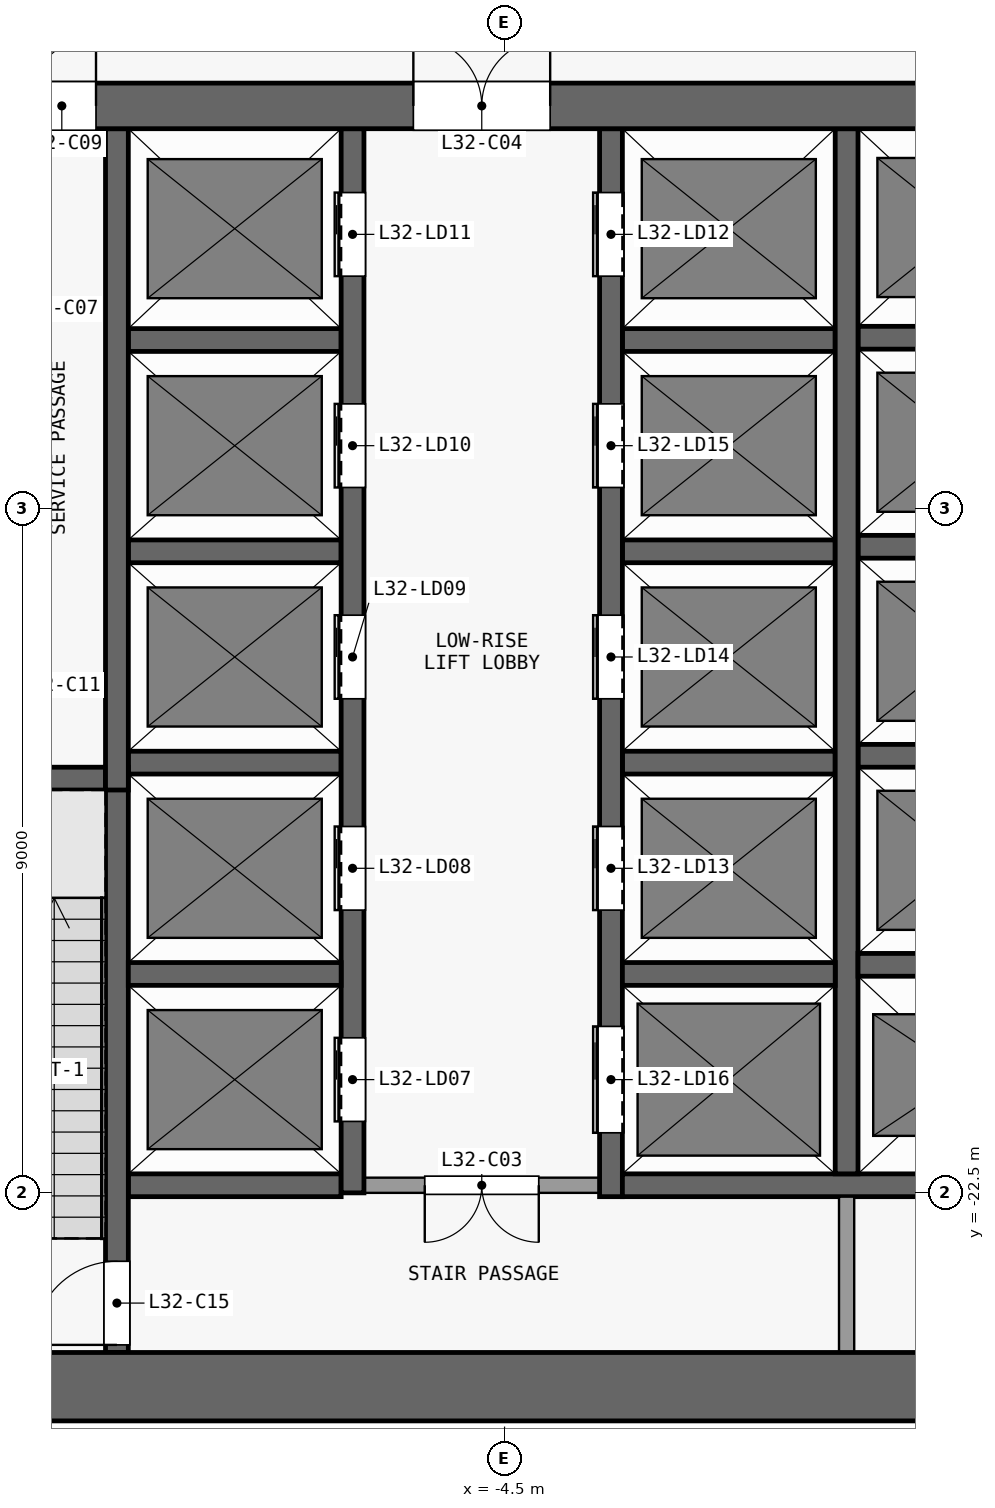
"""IFC4 building model, lengths in metres.
Left out: names, types, materials, properties, quantities, classifications, styles, units other than length and angle.
Written with IfcOpenShell. Run it as: python <this file> out.ifc"""

import sys

from ifc_helpers import new_model, si_unit, direction, frame, frame_2d, origin, place, context, subcontext, project, spatial, rectangle, extrude, element, fill, save


model = new_model("IFC4")
c1 = context("Model", 3, precision=1e-05, world=origin(), true_north=direction((0.0, 1.0)))
c2 = subcontext(c1, "Body", "Model", "MODEL_VIEW")
j1 = project(units=[si_unit("LENGTHUNIT", "METRE"), si_unit("PLANEANGLEUNIT", "RADIAN")], contexts=[c1])
p1 = place(None, origin())
s1 = spatial("IfcSite", under=j1, at=p1, CompositionType="ELEMENT")
p2 = place(p1, origin())
s2 = spatial("IfcBuilding", under=s1, at=p2, CompositionType="ELEMENT")
p3 = place(p2, frame((0.0, 0.0, 127.9)))
s3 = spatial("IfcBuildingStorey", under=s2, at=p3, CompositionType="ELEMENT", Elevation=127.9)
p4 = place(p3, frame((-13.4, -25.05, 0.0), z_axis=(0.0, 0.0, 1.0), x_axis=(1.0, 0.0, 0.0)))
e1 = element("IfcWall", 1, at=p4, inside=s3, PredefinedType="SHEAR", context=c2, shape_type="SweptSolid", body=[
    extrude(rectangle(XDim=26.8, YDim=0.9, at=frame_2d((13.4, 0.0))), origin(), (0.0, 0.0, 1.0), 5.7),
])
p5 = place(p3, frame((-13.4, -8.2, 0.0), z_axis=(0.0, 0.0, 1.0), x_axis=(1.0, 0.0, 0.0)))
e2 = element("IfcWall", 2, at=p5, inside=s3, PredefinedType="SHEAR", context=c2, shape_type="SweptSolid", body=[
    extrude(rectangle(XDim=26.8, YDim=0.6, at=frame_2d((13.4, 0.0))), origin(), (0.0, 0.0, 1.0), 5.7),
])
p6 = place(p5, frame((7.7, 0.0, 0.0)))
e3 = element("IfcOpeningElement", 3, at=p6, cuts=e2, PredefinedType="OPENING", context=c2, shape_type="SweptSolid", body=[
    extrude(rectangle(XDim=1.8, YDim=2.1, at=frame_2d((0.9, 1.05))), frame((0.0, 0.31, 0.0), z_axis=(0.0, -1.0, 0.0), x_axis=(1.0, 0.0, 0.0)), (0.0, 0.0, 1.0), 0.62),
])
p7 = place(p5, frame((17.3, 0.0, 0.0)))
e4 = element("IfcOpeningElement", 4, at=p7, cuts=e2, PredefinedType="OPENING", context=c2, shape_type="SweptSolid", body=[
    extrude(rectangle(XDim=1.8, YDim=2.1, at=frame_2d((0.9, 1.05))), frame((0.0, 0.31, 0.0), z_axis=(0.0, -1.0, 0.0), x_axis=(1.0, 0.0, 0.0)), (0.0, 0.0, 1.0), 0.62),
])
p8 = place(p5, frame((2.625, 0.0, 0.0)))
e5 = element("IfcOpeningElement", 5, at=p8, cuts=e2, PredefinedType="OPENING", context=c2, shape_type="SweptSolid", body=[
    extrude(rectangle(XDim=0.9, YDim=2.1, at=frame_2d((0.45, 1.05))), frame((0.0, 0.31, 0.0), z_axis=(0.0, -1.0, 0.0), x_axis=(1.0, 0.0, 0.0)), (0.0, 0.0, 1.0), 0.62),
])
p9 = place(p5, frame((23.275, 0.0, 0.0)))
e6 = element("IfcOpeningElement", 6, at=p9, cuts=e2, PredefinedType="OPENING", context=c2, shape_type="SweptSolid", body=[
    extrude(rectangle(XDim=0.9, YDim=2.1, at=frame_2d((0.45, 1.05))), frame((0.0, 0.31, 0.0), z_axis=(0.0, -1.0, 0.0), x_axis=(1.0, 0.0, 0.0)), (0.0, 0.0, 1.0), 0.62),
])
p10 = place(p3, frame((-9.45, -22.4, 0.0), z_axis=(0.0, 0.0, 1.0), x_axis=(1.0, 0.0, 0.0)))
e7 = element("IfcWall", 7, at=p10, inside=s3, PredefinedType="SHEAR", context=c2, shape_type="SweptSolid", body=[
    extrude(rectangle(XDim=2.8, YDim=0.3, at=frame_2d((1.4, 0.0))), origin(), (0.0, 0.0, 1.0), 5.7),
])
p11 = place(p3, frame((-3.25, -22.4, 0.0), z_axis=(0.0, 0.0, 1.0), x_axis=(-1.0, 0.0, 0.0)))
e8 = element("IfcWall", 8, at=p11, inside=s3, PredefinedType="PARTITIONING", context=c2, shape_type="SweptSolid", body=[
    extrude(rectangle(XDim=3.1, YDim=0.2, at=frame_2d((1.55, 0.0))), origin(), (0.0, 0.0, 1.0), 5.7),
])
p12 = place(p11, frame((0.8, 0.0, 0.0)))
e9 = element("IfcOpeningElement", 9, at=p12, cuts=e8, PredefinedType="OPENING", context=c2, shape_type="SweptSolid", body=[
    extrude(rectangle(XDim=1.5, YDim=2.1, at=frame_2d((0.75, 1.05))), frame((0.0, 0.11, 0.0), z_axis=(0.0, -1.0, 0.0), x_axis=(1.0, 0.0, 0.0)), (0.0, 0.0, 1.0), 0.22),
])
p13 = place(p3, frame((-2.95, -22.4, 0.0), z_axis=(0.0, 0.0, 1.0), x_axis=(1.0, 0.0, 0.0)))
e10 = element("IfcWall", 10, at=p13, inside=s3, PredefinedType="SHEAR", context=c2, shape_type="SweptSolid", body=[
    extrude(rectangle(XDim=5.9, YDim=0.3, at=frame_2d((2.95, 0.0))), origin(), (0.0, 0.0, 1.0), 5.7),
])
for number, where, z_axis, x_axis in (
    (11, (-9.45, -19.62, 0.0), (0.0, 0.0, 1.0), (1.0, 0.0, 0.0)),
    (12, (-2.95, -19.62, 0.0), (0.0, 0.0, 1.0), (1.0, 0.0, 0.0)),
    (13, (0.15, -19.5, 0.0), (0.0, 0.0, 1.0), (1.0, 0.0, 0.0)),
):
    element("IfcWall", number, at=place(p3, frame(where, z_axis=z_axis, x_axis=x_axis)), inside=s3, PredefinedType="SHEAR", context=c2, shape_type="SweptSolid", body=[
        extrude(rectangle(XDim=2.8, YDim=0.3, at=frame_2d((1.4, 0.0))), origin(), (0.0, 0.0, 1.0), 5.7),
    ])
p14 = place(p3, frame((-12.6, -17.05, 0.0), z_axis=(0.0, 0.0, 1.0), x_axis=(1.0, 0.0, 0.0)))
e14 = element("IfcWall", 14, at=p14, inside=s3, PredefinedType="SHEAR", context=c2, shape_type="SweptSolid", body=[
    extrude(rectangle(XDim=2.85, YDim=0.3, at=frame_2d((1.425, 0.0))), origin(), (0.0, 0.0, 1.0), 5.7),
])
for number, where, z_axis, x_axis in (
    (15, (-9.45, -16.84, 0.0), (0.0, 0.0, 1.0), (1.0, 0.0, 0.0)),
    (16, (-2.95, -16.84, 0.0), (0.0, 0.0, 1.0), (1.0, 0.0, 0.0)),
    (17, (0.15, -16.75, 0.0), (0.0, 0.0, 1.0), (1.0, 0.0, 0.0)),
    (18, (-9.45, -14.06, 0.0), (0.0, 0.0, 1.0), (1.0, 0.0, 0.0)),
    (19, (-2.95, -14.06, 0.0), (0.0, 0.0, 1.0), (1.0, 0.0, 0.0)),
    (20, (0.15, -14.0, 0.0), (0.0, 0.0, 1.0), (1.0, 0.0, 0.0)),
    (21, (-9.45, -11.28, 0.0), (0.0, 0.0, 1.0), (1.0, 0.0, 0.0)),
    (22, (-2.95, -11.28, 0.0), (0.0, 0.0, 1.0), (1.0, 0.0, 0.0)),
    (23, (0.15, -11.25, 0.0), (0.0, 0.0, 1.0), (1.0, 0.0, 0.0)),
):
    element("IfcWall", number, at=place(p3, frame(where, z_axis=z_axis, x_axis=x_axis)), inside=s3, PredefinedType="SHEAR", context=c2, shape_type="SweptSolid", body=[
        extrude(rectangle(XDim=2.8, YDim=0.3, at=frame_2d((1.4, 0.0))), origin(), (0.0, 0.0, 1.0), 5.7),
    ])
p15 = place(p3, frame((-9.6, -24.6, 0.0), z_axis=(0.0, 0.0, 1.0), x_axis=(0.0, 1.0, 0.0)))
e24 = element("IfcWall", 24, at=p15, inside=s3, PredefinedType="SHEAR", context=c2, shape_type="SweptSolid", body=[
    extrude(rectangle(XDim=7.7, YDim=0.3, at=frame_2d((3.85, 0.0))), origin(), (0.0, 0.0, 1.0), 5.7),
])
p16 = place(p15, frame((0.1, 0.0, 0.0)))
e25 = element("IfcOpeningElement", 25, at=p16, cuts=e24, PredefinedType="OPENING", context=c2, shape_type="SweptSolid", body=[
    extrude(rectangle(XDim=1.1, YDim=2.1, at=frame_2d((0.55, 1.05))), frame((0.0, 0.16, 0.0), z_axis=(0.0, -1.0, 0.0), x_axis=(1.0, 0.0, 0.0)), (0.0, 0.0, 1.0), 0.32),
])
p17 = place(p3, frame((-9.6, -17.2, 0.0), z_axis=(0.0, 0.0, 1.0), x_axis=(0.0, 1.0, 0.0)))
e26 = element("IfcWall", 26, at=p17, inside=s3, PredefinedType="SHEAR", context=c2, shape_type="SweptSolid", body=[
    extrude(rectangle(XDim=8.7, YDim=0.3, at=frame_2d((4.35, 0.0))), origin(), (0.0, 0.0, 1.0), 5.7),
])
p18 = place(p3, frame((-6.5, -22.5, 0.0), z_axis=(0.0, 0.0, 1.0), x_axis=(0.0, 1.0, 0.0)))
e27 = element("IfcWall", 27, at=p18, inside=s3, PredefinedType="SHEAR", context=c2, shape_type="SweptSolid", body=[
    extrude(rectangle(XDim=14.0, YDim=0.3, at=frame_2d((7.0, 0.0))), origin(), (0.0, 0.0, 1.0), 5.7),
])
p19 = place(p18, frame((0.94, 0.0, 0.0)))
e28 = element("IfcOpeningElement", 28, at=p19, cuts=e27, PredefinedType="OPENING", context=c2, shape_type="SweptSolid", body=[
    extrude(rectangle(XDim=1.1, YDim=2.1, at=frame_2d((0.55, 1.05))), frame((0.0, 0.16, 0.0), z_axis=(0.0, -1.0, 0.0), x_axis=(1.0, 0.0, 0.0)), (0.0, 0.0, 1.0), 0.32),
])
p20 = place(p18, frame((3.72, 0.0, 0.0)))
e29 = element("IfcOpeningElement", 29, at=p20, cuts=e27, PredefinedType="OPENING", context=c2, shape_type="SweptSolid", body=[
    extrude(rectangle(XDim=1.1, YDim=2.1, at=frame_2d((0.55, 1.05))), frame((0.0, 0.16, 0.0), z_axis=(0.0, -1.0, 0.0), x_axis=(1.0, 0.0, 0.0)), (0.0, 0.0, 1.0), 0.32),
])
p21 = place(p18, frame((6.5, 0.0, 0.0)))
e30 = element("IfcOpeningElement", 30, at=p21, cuts=e27, PredefinedType="OPENING", context=c2, shape_type="SweptSolid", body=[
    extrude(rectangle(XDim=1.1, YDim=2.1, at=frame_2d((0.55, 1.05))), frame((0.0, 0.16, 0.0), z_axis=(0.0, -1.0, 0.0), x_axis=(1.0, 0.0, 0.0)), (0.0, 0.0, 1.0), 0.32),
])
p22 = place(p18, frame((9.28, 0.0, 0.0)))
e31 = element("IfcOpeningElement", 31, at=p22, cuts=e27, PredefinedType="OPENING", context=c2, shape_type="SweptSolid", body=[
    extrude(rectangle(XDim=1.1, YDim=2.1, at=frame_2d((0.55, 1.05))), frame((0.0, 0.16, 0.0), z_axis=(0.0, -1.0, 0.0), x_axis=(1.0, 0.0, 0.0)), (0.0, 0.0, 1.0), 0.32),
])
p23 = place(p18, frame((12.06, 0.0, 0.0)))
e32 = element("IfcOpeningElement", 32, at=p23, cuts=e27, PredefinedType="OPENING", context=c2, shape_type="SweptSolid", body=[
    extrude(rectangle(XDim=1.1, YDim=2.1, at=frame_2d((0.55, 1.05))), frame((0.0, 0.16, 0.0), z_axis=(0.0, -1.0, 0.0), x_axis=(1.0, 0.0, 0.0)), (0.0, 0.0, 1.0), 0.32),
])
p24 = place(p3, frame((-3.1, -22.55, 0.0), z_axis=(0.0, 0.0, 1.0), x_axis=(0.0, 1.0, 0.0)))
e33 = element("IfcWall", 33, at=p24, inside=s3, PredefinedType="SHEAR", context=c2, shape_type="SweptSolid", body=[
    extrude(rectangle(XDim=14.05, YDim=0.3, at=frame_2d((7.025, 0.0))), origin(), (0.0, 0.0, 1.0), 5.7),
])
p25 = place(p24, frame((12.11, 0.0, 0.0)))
e34 = element("IfcOpeningElement", 34, at=p25, cuts=e33, PredefinedType="OPENING", context=c2, shape_type="SweptSolid", body=[
    extrude(rectangle(XDim=1.1, YDim=2.1, at=frame_2d((0.55, 1.05))), frame((0.0, 0.16, 0.0), z_axis=(0.0, -1.0, 0.0), x_axis=(1.0, 0.0, 0.0)), (0.0, 0.0, 1.0), 0.32),
])
p26 = place(p24, frame((3.77, 0.0, 0.0)))
e35 = element("IfcOpeningElement", 35, at=p26, cuts=e33, PredefinedType="OPENING", context=c2, shape_type="SweptSolid", body=[
    extrude(rectangle(XDim=1.1, YDim=2.1, at=frame_2d((0.55, 1.05))), frame((0.0, 0.16, 0.0), z_axis=(0.0, -1.0, 0.0), x_axis=(1.0, 0.0, 0.0)), (0.0, 0.0, 1.0), 0.32),
])
p27 = place(p24, frame((6.55, 0.0, 0.0)))
e36 = element("IfcOpeningElement", 36, at=p27, cuts=e33, PredefinedType="OPENING", context=c2, shape_type="SweptSolid", body=[
    extrude(rectangle(XDim=1.1, YDim=2.1, at=frame_2d((0.55, 1.05))), frame((0.0, 0.16, 0.0), z_axis=(0.0, -1.0, 0.0), x_axis=(1.0, 0.0, 0.0)), (0.0, 0.0, 1.0), 0.32),
])
p28 = place(p24, frame((9.33, 0.0, 0.0)))
e37 = element("IfcOpeningElement", 37, at=p28, cuts=e33, PredefinedType="OPENING", context=c2, shape_type="SweptSolid", body=[
    extrude(rectangle(XDim=1.1, YDim=2.1, at=frame_2d((0.55, 1.05))), frame((0.0, 0.16, 0.0), z_axis=(0.0, -1.0, 0.0), x_axis=(1.0, 0.0, 0.0)), (0.0, 0.0, 1.0), 0.32),
])
p29 = place(p24, frame((0.84, 0.0, 0.0)))
e38 = element("IfcOpeningElement", 38, at=p29, cuts=e33, PredefinedType="OPENING", context=c2, shape_type="SweptSolid", body=[
    extrude(rectangle(XDim=1.4, YDim=2.1, at=frame_2d((0.7, 1.05))), frame((0.0, 0.16, 0.0), z_axis=(0.0, -1.0, 0.0), x_axis=(1.0, 0.0, 0.0)), (0.0, 0.0, 1.0), 0.32),
])
p30 = place(p3, frame((0.0, -24.6, 0.0), z_axis=(0.0, 0.0, 1.0), x_axis=(0.0, 1.0, 0.0)))
e39 = element("IfcWall", 39, at=p30, inside=s3, PredefinedType="PARTITIONING", context=c2, shape_type="SweptSolid", body=[
    extrude(rectangle(XDim=2.05, YDim=0.2, at=frame_2d((1.025, 0.0))), origin(), (0.0, 0.0, 1.0), 5.7),
])
p31 = place(p3, frame((0.0, -22.25, 0.0), z_axis=(0.0, 0.0, 1.0), x_axis=(0.0, 1.0, 0.0)))
e40 = element("IfcWall", 40, at=p31, inside=s3, PredefinedType="SHEAR", context=c2, shape_type="SweptSolid", body=[
    extrude(rectangle(XDim=13.75, YDim=0.3, at=frame_2d((6.875, 0.0))), origin(), (0.0, 0.0, 1.0), 5.7),
])
p32 = place(p19, origin())
e41 = element("IfcDoor", 41, at=p32, inside=s3, OperationType="DOUBLE_DOOR_SLIDING", PredefinedType="DOOR", context=c2, shape_type="SweptSolid", body=[
    extrude(rectangle(XDim=1.1, YDim=2.1, at=frame_2d((0.55, 1.05))), frame((0.0, 0.025, 0.0), z_axis=(0.0, -1.0, 0.0), x_axis=(1.0, 0.0, 0.0)), (0.0, 0.0, 1.0), 0.05),
])
fill(e28, e41)
p33 = place(p20, origin())
e42 = element("IfcDoor", 42, at=p33, inside=s3, OperationType="DOUBLE_DOOR_SLIDING", PredefinedType="DOOR", context=c2, shape_type="SweptSolid", body=[
    extrude(rectangle(XDim=1.1, YDim=2.1, at=frame_2d((0.55, 1.05))), frame((0.0, 0.025, 0.0), z_axis=(0.0, -1.0, 0.0), x_axis=(1.0, 0.0, 0.0)), (0.0, 0.0, 1.0), 0.05),
])
fill(e29, e42)
p34 = place(p21, origin())
e43 = element("IfcDoor", 43, at=p34, inside=s3, OperationType="DOUBLE_DOOR_SLIDING", PredefinedType="DOOR", context=c2, shape_type="SweptSolid", body=[
    extrude(rectangle(XDim=1.1, YDim=2.1, at=frame_2d((0.55, 1.05))), frame((0.0, 0.025, 0.0), z_axis=(0.0, -1.0, 0.0), x_axis=(1.0, 0.0, 0.0)), (0.0, 0.0, 1.0), 0.05),
])
fill(e30, e43)
p35 = place(p22, origin())
e44 = element("IfcDoor", 44, at=p35, inside=s3, OperationType="DOUBLE_DOOR_SLIDING", PredefinedType="DOOR", context=c2, shape_type="SweptSolid", body=[
    extrude(rectangle(XDim=1.1, YDim=2.1, at=frame_2d((0.55, 1.05))), frame((0.0, 0.025, 0.0), z_axis=(0.0, -1.0, 0.0), x_axis=(1.0, 0.0, 0.0)), (0.0, 0.0, 1.0), 0.05),
])
fill(e31, e44)
p36 = place(p23, origin())
e45 = element("IfcDoor", 45, at=p36, inside=s3, OperationType="DOUBLE_DOOR_SLIDING", PredefinedType="DOOR", context=c2, shape_type="SweptSolid", body=[
    extrude(rectangle(XDim=1.1, YDim=2.1, at=frame_2d((0.55, 1.05))), frame((0.0, 0.025, 0.0), z_axis=(0.0, -1.0, 0.0), x_axis=(1.0, 0.0, 0.0)), (0.0, 0.0, 1.0), 0.05),
])
fill(e32, e45)
p37 = place(p25, origin())
e46 = element("IfcDoor", 46, at=p37, inside=s3, OperationType="DOUBLE_DOOR_SLIDING", PredefinedType="DOOR", context=c2, shape_type="SweptSolid", body=[
    extrude(rectangle(XDim=1.1, YDim=2.1, at=frame_2d((0.55, 1.05))), frame((0.0, 0.025, 0.0), z_axis=(0.0, -1.0, 0.0), x_axis=(1.0, 0.0, 0.0)), (0.0, 0.0, 1.0), 0.05),
])
fill(e34, e46)
p38 = place(p26, origin())
e47 = element("IfcDoor", 47, at=p38, inside=s3, OperationType="DOUBLE_DOOR_SLIDING", PredefinedType="DOOR", context=c2, shape_type="SweptSolid", body=[
    extrude(rectangle(XDim=1.1, YDim=2.1, at=frame_2d((0.55, 1.05))), frame((0.0, 0.025, 0.0), z_axis=(0.0, -1.0, 0.0), x_axis=(1.0, 0.0, 0.0)), (0.0, 0.0, 1.0), 0.05),
])
fill(e35, e47)
p39 = place(p27, origin())
e48 = element("IfcDoor", 48, at=p39, inside=s3, OperationType="DOUBLE_DOOR_SLIDING", PredefinedType="DOOR", context=c2, shape_type="SweptSolid", body=[
    extrude(rectangle(XDim=1.1, YDim=2.1, at=frame_2d((0.55, 1.05))), frame((0.0, 0.025, 0.0), z_axis=(0.0, -1.0, 0.0), x_axis=(1.0, 0.0, 0.0)), (0.0, 0.0, 1.0), 0.05),
])
fill(e36, e48)
p40 = place(p28, origin())
e49 = element("IfcDoor", 49, at=p40, inside=s3, OperationType="DOUBLE_DOOR_SLIDING", PredefinedType="DOOR", context=c2, shape_type="SweptSolid", body=[
    extrude(rectangle(XDim=1.1, YDim=2.1, at=frame_2d((0.55, 1.05))), frame((0.0, 0.025, 0.0), z_axis=(0.0, -1.0, 0.0), x_axis=(1.0, 0.0, 0.0)), (0.0, 0.0, 1.0), 0.05),
])
fill(e37, e49)
p41 = place(p29, origin())
e50 = element("IfcDoor", 50, at=p41, inside=s3, OperationType="DOUBLE_DOOR_SLIDING", PredefinedType="DOOR", context=c2, shape_type="SweptSolid", body=[
    extrude(rectangle(XDim=1.4, YDim=2.1, at=frame_2d((0.7, 1.05))), frame((0.0, 0.025, 0.0), z_axis=(0.0, -1.0, 0.0), x_axis=(1.0, 0.0, 0.0)), (0.0, 0.0, 1.0), 0.05),
])
fill(e38, e50)
p42 = place(p12, origin())
e51 = element("IfcDoor", 51, at=p42, inside=s3, OperationType="DOUBLE_DOOR_SINGLE_SWING", PredefinedType="DOOR", context=c2, shape_type="SweptSolid", body=[
    extrude(rectangle(XDim=1.5, YDim=2.1, at=frame_2d((0.75, 1.05))), frame((0.0, 0.025, 0.0), z_axis=(0.0, -1.0, 0.0), x_axis=(1.0, 0.0, 0.0)), (0.0, 0.0, 1.0), 0.05),
])
fill(e9, e51)
p43 = place(p6, origin())
e52 = element("IfcDoor", 52, at=p43, inside=s3, OperationType="DOUBLE_DOOR_SINGLE_SWING", PredefinedType="DOOR", context=c2, shape_type="SweptSolid", body=[
    extrude(rectangle(XDim=1.8, YDim=2.1, at=frame_2d((0.9, 1.05))), frame((0.0, 0.025, 0.0), z_axis=(0.0, -1.0, 0.0), x_axis=(1.0, 0.0, 0.0)), (0.0, 0.0, 1.0), 0.05),
])
fill(e3, e52)
p44 = place(p8, origin())
e53 = element("IfcDoor", 53, at=p44, inside=s3, OperationType="SINGLE_SWING_RIGHT", PredefinedType="DOOR", context=c2, shape_type="SweptSolid", body=[
    extrude(rectangle(XDim=0.9, YDim=2.1, at=frame_2d((0.45, 1.05))), frame((0.0, 0.025, 0.0), z_axis=(0.0, -1.0, 0.0), x_axis=(1.0, 0.0, 0.0)), (0.0, 0.0, 1.0), 0.05),
])
fill(e5, e53)
p45 = place(p16, origin())
e54 = element("IfcDoor", 54, at=p45, inside=s3, OperationType="SINGLE_SWING_LEFT", PredefinedType="DOOR", context=c2, shape_type="SweptSolid", body=[
    extrude(rectangle(XDim=1.1, YDim=2.1, at=frame_2d((0.55, 1.05))), frame((0.0, 0.025, 0.0), z_axis=(0.0, -1.0, 0.0), x_axis=(1.0, 0.0, 0.0)), (0.0, 0.0, 1.0), 0.05),
])
fill(e25, e54)
save(model, sys.argv[1])
